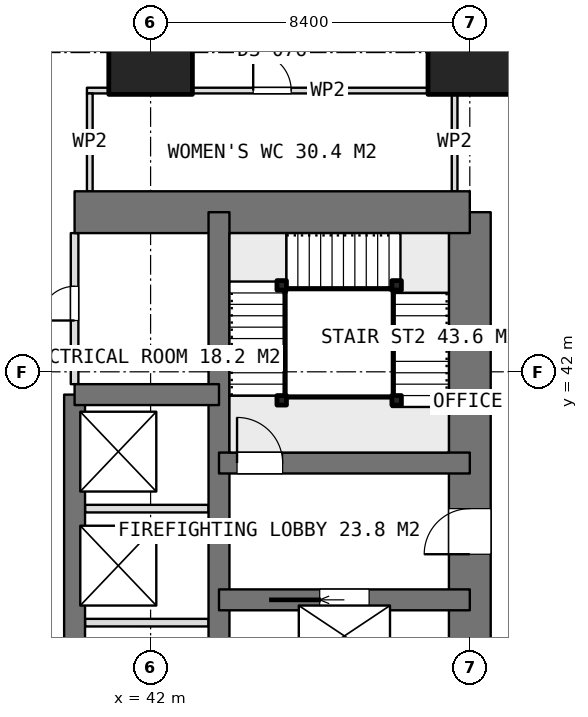
"""IFC4 building model, lengths in metres.
Left out: names, types, materials, properties, quantities, classifications, styles, units other than length and angle.
Written with IfcOpenShell. Run it as: python <this file> out.ifc"""

import sys

from ifc_helpers import new_model, si_unit, direction, frame, frame_2d, origin, origin_2d, place, context, subcontext, project, spatial, rectangle, extrude, element, fill, save


model = new_model("IFC4")
c1 = context("Model", 3, precision=1e-05, world=origin(), true_north=direction((0.0, 1.0)))
c2 = subcontext(c1, "Body", "Model", "MODEL_VIEW")
j1 = project(units=[si_unit("LENGTHUNIT", "METRE"), si_unit("PLANEANGLEUNIT", "RADIAN")], contexts=[c1])
p1 = place(None, origin())
s1 = spatial("IfcSite", under=j1, at=p1, CompositionType="ELEMENT")
p2 = place(p1, origin())
s2 = spatial("IfcBuilding", under=s1, at=p2, CompositionType="ELEMENT")
p3 = place(p2, frame((0.0, 0.0, 66.65)))
s3 = spatial("IfcBuildingStorey", under=s2, at=p3, CompositionType="ELEMENT", Elevation=66.65)
p4 = place(p3, frame((40.0, 46.2, 0.0), z_axis=(0.0, 0.0, 1.0), x_axis=(1.0, 0.0, 0.0)))
e1 = element("IfcWall", 1, at=p4, inside=s3, PredefinedType="SHEAR", context=c2, shape_type="SweptSolid", body=[
    extrude(rectangle(XDim=10.4, YDim=1.1, at=frame_2d((5.2, 0.0))), origin(), (0.0, 0.0, 1.0), 3.75),
])
p5 = place(p3, frame((50.4, 21.0, 0.0), z_axis=(0.0, 0.0, 1.0), x_axis=(0.0, 1.0, 0.0)))
e2 = element("IfcWall", 2, at=p5, inside=s3, PredefinedType="SHEAR", context=c2, shape_type="SweptSolid", body=[
    extrude(rectangle(XDim=25.2, YDim=1.1, at=frame_2d((12.6, 0.0))), origin(), (0.0, 0.0, 1.0), 3.75),
])
p6 = place(p5, frame((16.2, 0.0, 0.0)))
e3 = element("IfcOpeningElement", 3, at=p6, cuts=e2, PredefinedType="OPENING", context=c2, shape_type="SweptSolid", body=[
    extrude(rectangle(XDim=1.2, YDim=2.1, at=frame_2d((0.6, 1.05))), frame((0.0, 0.56, 0.0), z_axis=(0.0, -1.0, 0.0), x_axis=(1.0, 0.0, 0.0)), (0.0, 0.0, 1.0), 1.12),
])
p7 = place(p5, frame((10.05, 0.0, 0.0)))
e4 = element("IfcOpeningElement", 4, at=p7, cuts=e2, PredefinedType="OPENING", context=c2, shape_type="SweptSolid", body=[
    extrude(rectangle(XDim=0.9, YDim=2.1, at=frame_2d((0.45, 1.05))), frame((0.0, 0.56, 0.0), z_axis=(0.0, -1.0, 0.0), x_axis=(1.0, 0.0, 0.0)), (0.0, 0.0, 1.0), 1.12),
])
p8 = place(p5, frame((7.45, 0.0, 0.0)))
e5 = element("IfcOpeningElement", 5, at=p8, cuts=e2, PredefinedType="OPENING", context=c2, shape_type="SweptSolid", body=[
    extrude(rectangle(XDim=0.9, YDim=2.1, at=frame_2d((0.45, 1.05))), frame((0.0, 0.56, 0.0), z_axis=(0.0, -1.0, 0.0), x_axis=(1.0, 0.0, 0.0)), (0.0, 0.0, 1.0), 1.12),
])
p9 = place(p5, frame((0.75, 0.0, 0.0)))
e6 = element("IfcOpeningElement", 6, at=p9, cuts=e2, PredefinedType="OPENING", context=c2, shape_type="SweptSolid", body=[
    extrude(rectangle(XDim=1.2, YDim=2.1, at=frame_2d((0.6, 1.05))), frame((0.0, 0.56, 0.0), z_axis=(0.0, -1.0, 0.0), x_axis=(1.0, 0.0, 0.0)), (0.0, 0.0, 1.0), 1.12),
])
p10 = place(p3, frame((43.8, 21.0, 0.0), z_axis=(0.0, 0.0, 1.0), x_axis=(0.0, 1.0, 0.0)))
e7 = element("IfcWall", 7, at=p10, inside=s3, PredefinedType="SHEAR", context=c2, shape_type="SweptSolid", body=[
    extrude(rectangle(XDim=25.2, YDim=0.55, at=frame_2d((12.6, 0.0))), origin(), (0.0, 0.0, 1.0), 3.75),
])
p11 = place(p3, frame((40.0, 23.4, 0.0), z_axis=(0.0, 0.0, 1.0), x_axis=(0.0, 1.0, 0.0)))
e8 = element("IfcWall", 8, at=p11, inside=s3, PredefinedType="SHEAR", context=c2, shape_type="SweptSolid", body=[
    extrude(rectangle(XDim=18.0, YDim=0.55, at=frame_2d((9.0, 0.0))), origin(), (0.0, 0.0, 1.0), 3.75),
])
p12 = place(p3, frame((40.0, 41.4, 0.0), z_axis=(0.0, 0.0, 1.0), x_axis=(1.0, 0.0, 0.0)))
e9 = element("IfcWall", 9, at=p12, inside=s3, PredefinedType="SHEAR", context=c2, shape_type="SweptSolid", body=[
    extrude(rectangle(XDim=3.8, YDim=0.55, at=frame_2d((1.9, 0.0))), origin(), (0.0, 0.0, 1.0), 3.75),
])
p13 = place(p3, frame((43.8, 36.0, 0.0), z_axis=(0.0, 0.0, 1.0), x_axis=(1.0, 0.0, 0.0)))
e10 = element("IfcWall", 10, at=p13, inside=s3, PredefinedType="SHEAR", context=c2, shape_type="SweptSolid", body=[
    extrude(rectangle(XDim=6.6, YDim=0.55, at=frame_2d((3.3, 0.0))), origin(), (0.0, 0.0, 1.0), 3.75),
])
p14 = place(p13, frame((2.65, 0.0, 0.0)))
e11 = element("IfcOpeningElement", 11, at=p14, cuts=e10, PredefinedType="OPENING", context=c2, shape_type="SweptSolid", body=[
    extrude(rectangle(XDim=1.3, YDim=2.1, at=frame_2d((0.65, 1.05))), frame((0.0, 0.285, 0.0), z_axis=(0.0, -1.0, 0.0), x_axis=(1.0, 0.0, 0.0)), (0.0, 0.0, 1.0), 0.57),
])
p15 = place(p3, frame((43.8, 39.6, 0.0), z_axis=(0.0, 0.0, 1.0), x_axis=(1.0, 0.0, 0.0)))
e12 = element("IfcWall", 12, at=p15, inside=s3, PredefinedType="SHEAR", context=c2, shape_type="SweptSolid", body=[
    extrude(rectangle(XDim=6.6, YDim=0.55, at=frame_2d((3.3, 0.0))), origin(), (0.0, 0.0, 1.0), 3.75),
])
p16 = place(p15, frame((0.475, 0.0, 0.0)))
e13 = element("IfcOpeningElement", 13, at=p16, cuts=e12, PredefinedType="OPENING", context=c2, shape_type="SweptSolid", body=[
    extrude(rectangle(XDim=1.2, YDim=2.1, at=frame_2d((0.6, 1.05))), frame((0.0, 0.285, 0.0), z_axis=(0.0, -1.0, 0.0), x_axis=(1.0, 0.0, 0.0)), (0.0, 0.0, 1.0), 0.57),
])
for number, where, z_axis, x_axis in (
    (14, (42.0, 50.4, 0.0), (0.0, 0.0, 1.0), (1.0, 0.0, 0.0)),
    (15, (50.4, 50.4, 0.0), (0.0, 0.0, 1.0), (1.0, 0.0, 0.0)),
):
    element("IfcColumn", number, at=place(p3, frame(where, z_axis=z_axis, x_axis=x_axis)), inside=s3, PredefinedType="COLUMN", context=c2, shape_type="SweptSolid", body=[
        extrude(rectangle(XDim=2.2, YDim=2.2, at=origin_2d()), origin(), (0.0, 0.0, 1.0), 3.75),
    ])
for number, where, z_axis, x_axis in (
    (16, (40.275, 35.4, 0.0), (0.0, 0.0, 1.0), (1.0, 0.0, 0.0)),
    (17, (40.275, 38.4, 0.0), (0.0, 0.0, 1.0), (1.0, 0.0, 0.0)),
):
    element("IfcWall", number, at=place(p3, frame(where, z_axis=z_axis, x_axis=x_axis)), inside=s3, PredefinedType="PARTITIONING", context=c2, shape_type="SweptSolid", body=[
        extrude(rectangle(XDim=3.25, YDim=0.2, at=frame_2d((1.625, 0.0))), origin(), (0.0, 0.0, 1.0), 3.5),
    ])
p17 = place(p3, frame((40.0, 41.675, 0.0), z_axis=(0.0, 0.0, 1.0), x_axis=(0.0, 1.0, 0.0)))
e18 = element("IfcWall", 18, at=p17, inside=s3, PredefinedType="PARTITIONING", context=c2, shape_type="SweptSolid", body=[
    extrude(rectangle(XDim=3.975, YDim=0.2, at=frame_2d((1.987, 0.0))), origin(), (0.0, 0.0, 1.0), 3.5),
])
p18 = place(p17, frame((1.675, 0.0, 0.0)))
e19 = element("IfcOpeningElement", 19, at=p18, cuts=e18, PredefinedType="OPENING", context=c2, shape_type="SweptSolid", body=[
    extrude(rectangle(XDim=0.9, YDim=2.1, at=frame_2d((0.45, 1.05))), frame((0.0, 0.11, 0.0), z_axis=(0.0, -1.0, 0.0), x_axis=(1.0, 0.0, 0.0)), (0.0, 0.0, 1.0), 0.22),
])
p19 = place(p3, frame((40.325, 49.4, 0.0), z_axis=(0.0, 0.0, 1.0), x_axis=(1.0, 0.0, 0.0)))
e20 = element("IfcWall", 20, at=p19, inside=s3, PredefinedType="PARTITIONING", context=c2, shape_type="SweptSolid", body=[
    extrude(rectangle(XDim=9.75, YDim=0.15, at=frame_2d((4.875, 0.0))), origin(), (0.0, 0.0, 1.0), 3.5),
])
p20 = place(p19, frame((4.375, 0.0, 0.0)))
e21 = element("IfcOpeningElement", 21, at=p20, cuts=e20, PredefinedType="OPENING", context=c2, shape_type="SweptSolid", body=[
    extrude(rectangle(XDim=1.0, YDim=2.1, at=frame_2d((0.5, 1.05))), frame((0.0, 0.085, 0.0), z_axis=(0.0, -1.0, 0.0), x_axis=(1.0, 0.0, 0.0)), (0.0, 0.0, 1.0), 0.17),
])
for number, where, z_axis, x_axis in (
    (22, (40.4, 46.75, 0.0), (0.0, 0.0, 1.0), (0.0, 1.0, 0.0)),
    (23, (50.0, 46.75, 0.0), (0.0, 0.0, 1.0), (0.0, 1.0, 0.0)),
):
    element("IfcWall", number, at=place(p3, frame(where, z_axis=z_axis, x_axis=x_axis)), inside=s3, PredefinedType="PARTITIONING", context=c2, shape_type="SweptSolid", body=[
        extrude(rectangle(XDim=2.575, YDim=0.15, at=frame_2d((1.288, 0.0))), origin(), (0.0, 0.0, 1.0), 3.5),
    ])
for number, where, z_axis, x_axis in (
    (24, (45.45, 41.25, 0.0), (0.0, 0.0, 1.0), (1.0, 0.0, 0.0)),
    (25, (45.45, 44.275, 0.0), (0.0, 0.0, 1.0), (1.0, 0.0, 0.0)),
    (26, (48.475, 44.275, 0.0), (0.0, 0.0, 1.0), (1.0, 0.0, 0.0)),
    (27, (48.475, 41.25, 0.0), (0.0, 0.0, 1.0), (1.0, 0.0, 0.0)),
):
    element("IfcColumn", number, at=place(p3, frame(where, z_axis=z_axis, x_axis=x_axis)), inside=s3, PredefinedType="COLUMN", context=c2, shape_type="SweptSolid", body=[
        extrude(rectangle(XDim=0.25, YDim=0.25, at=origin_2d()), origin(), (0.0, 0.0, 1.0), 3.75),
    ])
p21 = place(p6, origin())
e28 = element("IfcDoor", 28, at=p21, inside=s3, OperationType="SINGLE_SWING_LEFT", PredefinedType="DOOR", context=c2, shape_type="SweptSolid", body=[
    extrude(rectangle(XDim=1.2, YDim=2.1, at=frame_2d((0.6, 1.05))), frame((0.0, 0.025, 0.0), z_axis=(0.0, -1.0, 0.0), x_axis=(1.0, 0.0, 0.0)), (0.0, 0.0, 1.0), 0.05),
])
fill(e3, e28)
p22 = place(p18, origin())
e29 = element("IfcDoor", 29, at=p22, inside=s3, OperationType="SINGLE_SWING_LEFT", PredefinedType="DOOR", context=c2, shape_type="SweptSolid", body=[
    extrude(rectangle(XDim=0.9, YDim=2.1, at=frame_2d((0.45, 1.05))), frame((0.0, 0.025, 0.0), z_axis=(0.0, -1.0, 0.0), x_axis=(1.0, 0.0, 0.0)), (0.0, 0.0, 1.0), 0.05),
])
fill(e19, e29)
p23 = place(p14, origin())
e30 = element("IfcDoor", 30, at=p23, inside=s3, OperationType="SLIDING_TO_LEFT", PredefinedType="USERDEFINED", context=c2, shape_type="SweptSolid", body=[
    extrude(rectangle(XDim=1.3, YDim=2.1, at=frame_2d((0.65, 1.05))), frame((0.0, 0.025, 0.0), z_axis=(0.0, -1.0, 0.0), x_axis=(1.0, 0.0, 0.0)), (0.0, 0.0, 1.0), 0.05),
])
fill(e11, e30)
p24 = place(p20, origin())
e31 = element("IfcDoor", 31, at=p24, inside=s3, OperationType="SINGLE_SWING_LEFT", PredefinedType="DOOR", context=c2, shape_type="SweptSolid", body=[
    extrude(rectangle(XDim=1.0, YDim=2.1, at=frame_2d((0.5, 1.05))), frame((0.0, 0.025, 0.0), z_axis=(0.0, -1.0, 0.0), x_axis=(1.0, 0.0, 0.0)), (0.0, 0.0, 1.0), 0.05),
])
fill(e21, e31)
p25 = place(p16, origin())
e32 = element("IfcDoor", 32, at=p25, inside=s3, OperationType="SINGLE_SWING_RIGHT", PredefinedType="DOOR", context=c2, shape_type="SweptSolid", body=[
    extrude(rectangle(XDim=1.2, YDim=2.1, at=frame_2d((0.6, 1.05))), frame((0.0, 0.025, 0.0), z_axis=(0.0, -1.0, 0.0), x_axis=(1.0, 0.0, 0.0)), (0.0, 0.0, 1.0), 0.05),
])
fill(e13, e32)
save(model, sys.argv[1])
